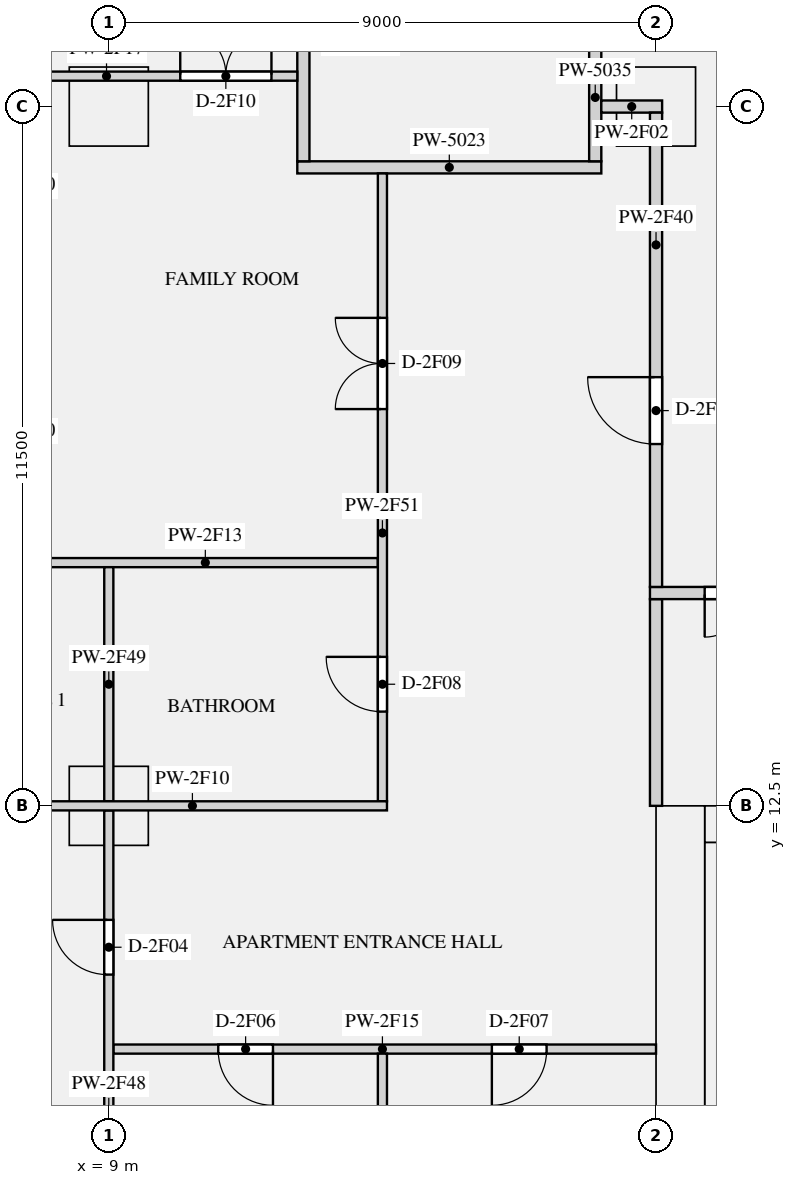
"""IFC4 building model, lengths in metres.
Left out: names, types, materials, properties, quantities, classifications, styles, units other than length and angle.
Written with IfcOpenShell. Run it as: python <this file> out.ifc"""

import sys

from ifc_helpers import new_model, si_unit, direction, frame, frame_2d, origin, origin_2d, place, context, subcontext, project, spatial, rectangle, extrude, element, fill, save


model = new_model("IFC4")
c1 = context("Model", 3, precision=1e-05, world=origin(), true_north=direction((0.0, 1.0)))
c2 = subcontext(c1, "Body", "Model", "MODEL_VIEW")
j1 = project(units=[si_unit("LENGTHUNIT", "METRE"), si_unit("PLANEANGLEUNIT", "RADIAN")], contexts=[c1])
p1 = place(None, origin())
s1 = spatial("IfcSite", under=j1, at=p1, CompositionType="ELEMENT")
p2 = place(p1, origin())
s2 = spatial("IfcBuilding", under=s1, at=p2, CompositionType="ELEMENT")
p3 = place(p2, frame((0.0, 0.0, 124.5)))
s3 = spatial("IfcBuildingStorey", under=s2, at=p3, CompositionType="ELEMENT", Elevation=124.5)
for number, where, z_axis, x_axis in (
    (1, (9.0, 24.0, 0.0), (0.0, 0.0, 1.0), (1.0, 0.0, 0.0)),
    (2, (18.0, 24.0, 0.0), (0.0, 0.0, 1.0), (1.0, 0.0, 0.0)),
    (3, (9.0, 12.5, 0.0), (0.0, 0.0, 1.0), (1.0, 0.0, 0.0)),
):
    element("IfcColumn", number, at=place(p3, frame(where, z_axis=z_axis, x_axis=x_axis)), inside=s3, PredefinedType="COLUMN", context=c2, shape_type="SweptSolid", body=[
        extrude(rectangle(XDim=1.3, YDim=1.3, at=origin_2d()), origin(), (0.0, 0.0, 1.0), 3.15),
    ])
p4 = place(p3, frame((18.4, 0.0, 0.0), z_axis=(0.0, 0.0, 1.0), x_axis=(0.0, 1.0, 0.0)))
e4 = element("IfcWall", 4, at=p4, inside=s3, PredefinedType="SHEAR", context=c2, shape_type="SweptSolid", body=[
    extrude(rectangle(XDim=12.5, YDim=0.8, at=frame_2d((6.25, 0.0))), origin(), (0.0, 0.0, 1.0), 3.15),
])
p5 = place(p3, frame((18.8, 12.2, 0.0), z_axis=(0.0, 0.0, 1.0), x_axis=(1.0, 0.0, 0.0)))
e5 = element("IfcWall", 5, at=p5, inside=s3, PredefinedType="SHEAR", context=c2, shape_type="SweptSolid", body=[
    extrude(rectangle(XDim=34.4, YDim=0.6, at=frame_2d((17.2, 0.0))), origin(), (0.0, 0.0, 1.0), 3.15),
])
p6 = place(p5, frame((24.375, 0.0, 0.0)))
e6 = element("IfcOpeningElement", 6, at=p6, cuts=e5, PredefinedType="OPENING", context=c2, shape_type="SweptSolid", body=[
    extrude(rectangle(XDim=1.1, YDim=2.1, at=frame_2d((0.55, 1.05))), frame((0.0, 0.31, 0.0), z_axis=(0.0, -1.0, 0.0), x_axis=(1.0, 0.0, 0.0)), (0.0, 0.0, 1.0), 0.62),
])
p7 = place(p5, frame((26.625, 0.0, 0.0)))
e7 = element("IfcOpeningElement", 7, at=p7, cuts=e5, PredefinedType="OPENING", context=c2, shape_type="SweptSolid", body=[
    extrude(rectangle(XDim=1.1, YDim=2.1, at=frame_2d((0.55, 1.05))), frame((0.0, 0.31, 0.0), z_axis=(0.0, -1.0, 0.0), x_axis=(1.0, 0.0, 0.0)), (0.0, 0.0, 1.0), 0.62),
])
p8 = place(p5, frame((28.875, 0.0, 0.0)))
e8 = element("IfcOpeningElement", 8, at=p8, cuts=e5, PredefinedType="OPENING", context=c2, shape_type="SweptSolid", body=[
    extrude(rectangle(XDim=1.1, YDim=2.1, at=frame_2d((0.55, 1.05))), frame((0.0, 0.31, 0.0), z_axis=(0.0, -1.0, 0.0), x_axis=(1.0, 0.0, 0.0)), (0.0, 0.0, 1.0), 0.62),
])
p9 = place(p5, frame((4.75, 0.0, 0.0)))
e9 = element("IfcOpeningElement", 9, at=p9, cuts=e5, PredefinedType="OPENING", context=c2, shape_type="SweptSolid", body=[
    extrude(rectangle(XDim=0.9, YDim=2.1, at=frame_2d((0.45, 1.05))), frame((0.0, 0.31, 0.0), z_axis=(0.0, -1.0, 0.0), x_axis=(1.0, 0.0, 0.0)), (0.0, 0.0, 1.0), 0.62),
])
p10 = place(p5, frame((11.75, 0.0, 0.0)))
e10 = element("IfcOpeningElement", 10, at=p10, cuts=e5, PredefinedType="OPENING", context=c2, shape_type="SweptSolid", body=[
    extrude(rectangle(XDim=0.9, YDim=2.1, at=frame_2d((0.45, 1.05))), frame((0.0, 0.31, 0.0), z_axis=(0.0, -1.0, 0.0), x_axis=(1.0, 0.0, 0.0)), (0.0, 0.0, 1.0), 0.62),
])
p11 = place(p5, frame((18.25, 0.0, 0.0)))
e11 = element("IfcOpeningElement", 11, at=p11, cuts=e5, PredefinedType="OPENING", context=c2, shape_type="SweptSolid", body=[
    extrude(rectangle(XDim=0.9, YDim=2.1, at=frame_2d((0.45, 1.05))), frame((0.0, 0.31, 0.0), z_axis=(0.0, -1.0, 0.0), x_axis=(1.0, 0.0, 0.0)), (0.0, 0.0, 1.0), 0.62),
])
p12 = place(p5, frame((1.35, 0.0, 0.0)))
e12 = element("IfcOpeningElement", 12, at=p12, cuts=e5, PredefinedType="OPENING", context=c2, shape_type="SweptSolid", body=[
    extrude(rectangle(XDim=1.2, YDim=2.1, at=frame_2d((0.6, 1.05))), frame((0.0, 0.31, 0.0), z_axis=(0.0, -1.0, 0.0), x_axis=(1.0, 0.0, 0.0)), (0.0, 0.0, 1.0), 0.62),
])
p13 = place(p5, frame((31.85, 0.0, 0.0)))
e13 = element("IfcOpeningElement", 13, at=p13, cuts=e5, PredefinedType="OPENING", context=c2, shape_type="SweptSolid", body=[
    extrude(rectangle(XDim=1.2, YDim=2.1, at=frame_2d((0.6, 1.05))), frame((0.0, 0.31, 0.0), z_axis=(0.0, -1.0, 0.0), x_axis=(1.0, 0.0, 0.0)), (0.0, 0.0, 1.0), 0.62),
])
p14 = place(p3, frame((18.9, 1.0, 0.0), z_axis=(0.0, 0.0, 1.0), x_axis=(0.0, 1.0, 0.0)))
e14 = element("IfcWall", 14, at=p14, inside=s3, PredefinedType="SHEAR", context=c2, shape_type="SweptSolid", body=[
    extrude(rectangle(XDim=10.9, YDim=0.2, at=frame_2d((5.45, 0.0))), origin(), (0.0, 0.0, 1.0), 3.15),
])
p15 = place(p3, frame((12.1, 23.0, 0.0), z_axis=(0.0, 0.0, 1.0), x_axis=(1.0, 0.0, 0.0)))
e15 = element("IfcWall", 15, at=p15, inside=s3, PredefinedType="PARTITIONING", context=c2, shape_type="SweptSolid", body=[
    extrude(rectangle(XDim=5.0, YDim=0.2, at=frame_2d((2.5, 0.0))), origin(), (0.0, 0.0, 1.0), 2.83),
])
p16 = place(p3, frame((18.0, 12.5, 0.0), z_axis=(0.0, 0.0, 1.0), x_axis=(0.0, 1.0, 0.0)))
e16 = element("IfcWall", 16, at=p16, inside=s3, PredefinedType="PARTITIONING", context=c2, shape_type="SweptSolid", body=[
    extrude(rectangle(XDim=3.4, YDim=0.2, at=frame_2d((1.7, 0.0))), origin(), (0.0, 0.0, 1.0), 2.83),
])
p17 = place(p3, frame((12.2, 23.1, 0.0), z_axis=(0.0, 0.0, 1.0), x_axis=(0.0, 1.0, 0.0)))
e17 = element("IfcWall", 17, at=p17, inside=s3, PredefinedType="PARTITIONING", context=c2, shape_type="SweptSolid", body=[
    extrude(rectangle(XDim=3.9, YDim=0.2, at=frame_2d((1.95, 0.0))), origin(), (0.0, 0.0, 1.0), 2.83),
])
p18 = place(p3, frame((17.0, 23.1, 0.0), z_axis=(0.0, 0.0, 1.0), x_axis=(0.0, 1.0, 0.0)))
e18 = element("IfcWall", 18, at=p18, inside=s3, PredefinedType="PARTITIONING", context=c2, shape_type="SweptSolid", body=[
    extrude(rectangle(XDim=3.8, YDim=0.2, at=frame_2d((1.9, 0.0))), origin(), (0.0, 0.0, 1.0), 2.83),
])
p19 = place(p18, frame((2.1, 0.0, 0.0)))
e19 = element("IfcOpeningElement", 19, at=p19, cuts=e18, PredefinedType="OPENING", context=c2, shape_type="SweptSolid", body=[
    extrude(rectangle(XDim=1.2, YDim=2.1, at=frame_2d((0.6, 1.05))), frame((0.0, 0.11, 0.0), z_axis=(0.0, -1.0, 0.0), x_axis=(1.0, 0.0, 0.0)), (0.0, 0.0, 1.0), 0.22),
])
p20 = place(p3, frame((17.1, 24.0, 0.0), z_axis=(0.0, 0.0, 1.0), x_axis=(1.0, 0.0, 0.0)))
e20 = element("IfcWall", 20, at=p20, inside=s3, PredefinedType="PARTITIONING", context=c2, shape_type="SweptSolid", body=[
    extrude(rectangle(XDim=1.0, YDim=0.2, at=frame_2d((0.5, 0.0))), origin(), (0.0, 0.0, 1.0), 2.83),
])
p21 = place(p3, frame((5.25, 12.5, 0.0), z_axis=(0.0, 0.0, 1.0), x_axis=(1.0, 0.0, 0.0)))
e21 = element("IfcWall", 21, at=p21, inside=s3, PredefinedType="PARTITIONING", context=c2, shape_type="SweptSolid", body=[
    extrude(rectangle(XDim=8.325, YDim=0.15, at=frame_2d((4.163, 0.0))), origin(), (0.0, 0.0, 1.0), 2.83),
])
p22 = place(p21, frame((1.025, 0.0, 0.0)))
e22 = element("IfcOpeningElement", 22, at=p22, cuts=e21, PredefinedType="OPENING", context=c2, shape_type="SweptSolid", body=[
    extrude(rectangle(XDim=0.9, YDim=2.1, at=frame_2d((0.45, 1.05))), frame((0.0, 0.085, 0.0), z_axis=(0.0, -1.0, 0.0), x_axis=(1.0, 0.0, 0.0)), (0.0, 0.0, 1.0), 0.17),
])
p23 = place(p3, frame((7.75, 16.5, 0.0), z_axis=(0.0, 0.0, 1.0), x_axis=(1.0, 0.0, 0.0)))
e23 = element("IfcWall", 23, at=p23, inside=s3, PredefinedType="PARTITIONING", context=c2, shape_type="SweptSolid", body=[
    extrude(rectangle(XDim=5.675, YDim=0.15, at=frame_2d((2.837, 0.0))), origin(), (0.0, 0.0, 1.0), 2.83),
])
p24 = place(p3, frame((9.075, 8.5, 0.0), z_axis=(0.0, 0.0, 1.0), x_axis=(1.0, 0.0, 0.0)))
e24 = element("IfcWall", 24, at=p24, inside=s3, PredefinedType="PARTITIONING", context=c2, shape_type="SweptSolid", body=[
    extrude(rectangle(XDim=8.925, YDim=0.15, at=frame_2d((4.462, 0.0))), origin(), (0.0, 0.0, 1.0), 2.83),
])
p25 = place(p24, frame((1.725, 0.0, 0.0)))
e25 = element("IfcOpeningElement", 25, at=p25, cuts=e24, PredefinedType="OPENING", context=c2, shape_type="SweptSolid", body=[
    extrude(rectangle(XDim=0.9, YDim=2.1, at=frame_2d((0.45, 1.05))), frame((0.0, 0.085, 0.0), z_axis=(0.0, -1.0, 0.0), x_axis=(1.0, 0.0, 0.0)), (0.0, 0.0, 1.0), 0.17),
])
p26 = place(p24, frame((6.225, 0.0, 0.0)))
e26 = element("IfcOpeningElement", 26, at=p26, cuts=e24, PredefinedType="OPENING", context=c2, shape_type="SweptSolid", body=[
    extrude(rectangle(XDim=0.9, YDim=2.1, at=frame_2d((0.45, 1.05))), frame((0.0, 0.085, 0.0), z_axis=(0.0, -1.0, 0.0), x_axis=(1.0, 0.0, 0.0)), (0.0, 0.0, 1.0), 0.17),
])
p27 = place(p3, frame((7.75, 24.5, 0.0), z_axis=(0.0, 0.0, 1.0), x_axis=(1.0, 0.0, 0.0)))
e27 = element("IfcWall", 27, at=p27, inside=s3, PredefinedType="PARTITIONING", context=c2, shape_type="SweptSolid", body=[
    extrude(rectangle(XDim=4.35, YDim=0.15, at=frame_2d((2.175, 0.0))), origin(), (0.0, 0.0, 1.0), 2.83),
])
p28 = place(p27, frame((2.425, 0.0, 0.0)))
e28 = element("IfcOpeningElement", 28, at=p28, cuts=e27, PredefinedType="OPENING", context=c2, shape_type="SweptSolid", body=[
    extrude(rectangle(XDim=1.5, YDim=2.1, at=frame_2d((0.75, 1.05))), frame((0.0, 0.085, 0.0), z_axis=(0.0, -1.0, 0.0), x_axis=(1.0, 0.0, 0.0)), (0.0, 0.0, 1.0), 0.17),
])
p29 = place(p3, frame((17.9, 16.0, 0.0), z_axis=(0.0, 0.0, 1.0), x_axis=(1.0, 0.0, 0.0)))
e29 = element("IfcWall", 29, at=p29, inside=s3, PredefinedType="PARTITIONING", context=c2, shape_type="SweptSolid", body=[
    extrude(rectangle(XDim=36.2, YDim=0.2, at=frame_2d((18.1, 0.0))), origin(), (0.0, 0.0, 1.0), 2.83),
])
p30 = place(p29, frame((0.9, 0.0, 0.0)))
e30 = element("IfcOpeningElement", 30, at=p30, cuts=e29, PredefinedType="OPENING", context=c2, shape_type="SweptSolid", body=[
    extrude(rectangle(XDim=1.4, YDim=2.1, at=frame_2d((0.7, 1.05))), frame((0.0, 0.11, 0.0), z_axis=(0.0, -1.0, 0.0), x_axis=(1.0, 0.0, 0.0)), (0.0, 0.0, 1.0), 0.22),
])
p31 = place(p29, frame((33.9, 0.0, 0.0)))
e31 = element("IfcOpeningElement", 31, at=p31, cuts=e29, PredefinedType="OPENING", context=c2, shape_type="SweptSolid", body=[
    extrude(rectangle(XDim=1.4, YDim=2.1, at=frame_2d((0.7, 1.05))), frame((0.0, 0.11, 0.0), z_axis=(0.0, -1.0, 0.0), x_axis=(1.0, 0.0, 0.0)), (0.0, 0.0, 1.0), 0.22),
])
p32 = place(p3, frame((18.0, 16.1, 0.0), z_axis=(0.0, 0.0, 1.0), x_axis=(0.0, 1.0, 0.0)))
e32 = element("IfcWall", 32, at=p32, inside=s3, PredefinedType="PARTITIONING", context=c2, shape_type="SweptSolid", body=[
    extrude(rectangle(XDim=7.8, YDim=0.2, at=frame_2d((3.9, 0.0))), origin(), (0.0, 0.0, 1.0), 2.83),
])
p33 = place(p32, frame((2.35, 0.0, 0.0)))
e33 = element("IfcOpeningElement", 33, at=p33, cuts=e32, PredefinedType="OPENING", context=c2, shape_type="SweptSolid", body=[
    extrude(rectangle(XDim=1.1, YDim=2.1, at=frame_2d((0.55, 1.05))), frame((0.0, 0.11, 0.0), z_axis=(0.0, -1.0, 0.0), x_axis=(1.0, 0.0, 0.0)), (0.0, 0.0, 1.0), 0.22),
])
p34 = place(p3, frame((9.0, 5.25, 0.0), z_axis=(0.0, 0.0, 1.0), x_axis=(0.0, 1.0, 0.0)))
e34 = element("IfcWall", 34, at=p34, inside=s3, PredefinedType="PARTITIONING", context=c2, shape_type="SweptSolid", body=[
    extrude(rectangle(XDim=7.175, YDim=0.15, at=frame_2d((3.587, 0.0))), origin(), (0.0, 0.0, 1.0), 2.83),
])
p35 = place(p34, frame((4.475, 0.0, 0.0)))
e35 = element("IfcOpeningElement", 35, at=p35, cuts=e34, PredefinedType="OPENING", context=c2, shape_type="SweptSolid", body=[
    extrude(rectangle(XDim=0.9, YDim=2.1, at=frame_2d((0.45, 1.05))), frame((0.0, 0.085, 0.0), z_axis=(0.0, -1.0, 0.0), x_axis=(1.0, 0.0, 0.0)), (0.0, 0.0, 1.0), 0.17),
])
p36 = place(p3, frame((9.0, 12.575, 0.0), z_axis=(0.0, 0.0, 1.0), x_axis=(0.0, 1.0, 0.0)))
e36 = element("IfcWall", 36, at=p36, inside=s3, PredefinedType="PARTITIONING", context=c2, shape_type="SweptSolid", body=[
    extrude(rectangle(XDim=3.85, YDim=0.15, at=frame_2d((1.925, 0.0))), origin(), (0.0, 0.0, 1.0), 2.83),
])
p37 = place(p3, frame((13.5, 0.75, 0.0), z_axis=(0.0, 0.0, 1.0), x_axis=(0.0, 1.0, 0.0)))
e37 = element("IfcWall", 37, at=p37, inside=s3, PredefinedType="PARTITIONING", context=c2, shape_type="SweptSolid", body=[
    extrude(rectangle(XDim=7.675, YDim=0.15, at=frame_2d((3.837, 0.0))), origin(), (0.0, 0.0, 1.0), 2.83),
])
p38 = place(p3, frame((13.5, 12.575, 0.0), z_axis=(0.0, 0.0, 1.0), x_axis=(0.0, 1.0, 0.0)))
e38 = element("IfcWall", 38, at=p38, inside=s3, PredefinedType="PARTITIONING", context=c2, shape_type="SweptSolid", body=[
    extrude(rectangle(XDim=10.325, YDim=0.15, at=frame_2d((5.163, 0.0))), origin(), (0.0, 0.0, 1.0), 2.83),
])
p39 = place(p38, frame((1.475, 0.0, 0.0)))
e39 = element("IfcOpeningElement", 39, at=p39, cuts=e38, PredefinedType="OPENING", context=c2, shape_type="SweptSolid", body=[
    extrude(rectangle(XDim=0.9, YDim=2.1, at=frame_2d((0.45, 1.05))), frame((0.0, 0.085, 0.0), z_axis=(0.0, -1.0, 0.0), x_axis=(1.0, 0.0, 0.0)), (0.0, 0.0, 1.0), 0.17),
])
p40 = place(p38, frame((6.45, 0.0, 0.0)))
e40 = element("IfcOpeningElement", 40, at=p40, cuts=e38, PredefinedType="OPENING", context=c2, shape_type="SweptSolid", body=[
    extrude(rectangle(XDim=1.5, YDim=2.1, at=frame_2d((0.75, 1.05))), frame((0.0, 0.085, 0.0), z_axis=(0.0, -1.0, 0.0), x_axis=(1.0, 0.0, 0.0)), (0.0, 0.0, 1.0), 0.17),
])
p41 = place(p30, frame((1.4, 0.0, 0.0), z_axis=(0.0, 0.0, 1.0), x_axis=(-1.0, 0.0, 0.0)))
e41 = element("IfcDoor", 41, at=p41, inside=s3, OperationType="DOUBLE_DOOR_SINGLE_SWING", PredefinedType="DOOR", context=c2, shape_type="SweptSolid", body=[
    extrude(rectangle(XDim=1.4, YDim=2.1, at=frame_2d((0.7, 1.05))), frame((0.0, 0.025, 0.0), z_axis=(0.0, -1.0, 0.0), x_axis=(1.0, 0.0, 0.0)), (0.0, 0.0, 1.0), 0.05),
])
fill(e30, e41)
p42 = place(p33, origin())
e42 = element("IfcDoor", 42, at=p42, inside=s3, OperationType="SINGLE_SWING_RIGHT", PredefinedType="DOOR", context=c2, shape_type="SweptSolid", body=[
    extrude(rectangle(XDim=1.1, YDim=2.1, at=frame_2d((0.55, 1.05))), frame((0.0, 0.025, 0.0), z_axis=(0.0, -1.0, 0.0), x_axis=(1.0, 0.0, 0.0)), (0.0, 0.0, 1.0), 0.05),
])
fill(e33, e42)
p43 = place(p35, origin())
e43 = element("IfcDoor", 43, at=p43, inside=s3, OperationType="SINGLE_SWING_RIGHT", PredefinedType="DOOR", context=c2, shape_type="SweptSolid", body=[
    extrude(rectangle(XDim=0.9, YDim=2.1, at=frame_2d((0.45, 1.05))), frame((0.0, 0.025, 0.0), z_axis=(0.0, -1.0, 0.0), x_axis=(1.0, 0.0, 0.0)), (0.0, 0.0, 1.0), 0.05),
])
fill(e35, e43)
p44 = place(p25, frame((0.9, 0.0, 0.0), z_axis=(0.0, 0.0, 1.0), x_axis=(-1.0, 0.0, 0.0)))
e44 = element("IfcDoor", 44, at=p44, inside=s3, OperationType="SINGLE_SWING_LEFT", PredefinedType="DOOR", context=c2, shape_type="SweptSolid", body=[
    extrude(rectangle(XDim=0.9, YDim=2.1, at=frame_2d((0.45, 1.05))), frame((0.0, 0.025, 0.0), z_axis=(0.0, -1.0, 0.0), x_axis=(1.0, 0.0, 0.0)), (0.0, 0.0, 1.0), 0.05),
])
fill(e25, e44)
p45 = place(p26, frame((0.9, 0.0, 0.0), z_axis=(0.0, 0.0, 1.0), x_axis=(-1.0, 0.0, 0.0)))
e45 = element("IfcDoor", 45, at=p45, inside=s3, OperationType="SINGLE_SWING_RIGHT", PredefinedType="DOOR", context=c2, shape_type="SweptSolid", body=[
    extrude(rectangle(XDim=0.9, YDim=2.1, at=frame_2d((0.45, 1.05))), frame((0.0, 0.025, 0.0), z_axis=(0.0, -1.0, 0.0), x_axis=(1.0, 0.0, 0.0)), (0.0, 0.0, 1.0), 0.05),
])
fill(e26, e45)
p46 = place(p39, origin())
e46 = element("IfcDoor", 46, at=p46, inside=s3, OperationType="SINGLE_SWING_RIGHT", PredefinedType="DOOR", context=c2, shape_type="SweptSolid", body=[
    extrude(rectangle(XDim=0.9, YDim=2.1, at=frame_2d((0.45, 1.05))), frame((0.0, 0.025, 0.0), z_axis=(0.0, -1.0, 0.0), x_axis=(1.0, 0.0, 0.0)), (0.0, 0.0, 1.0), 0.05),
])
fill(e39, e46)
p47 = place(p40, origin())
e47 = element("IfcDoor", 47, at=p47, inside=s3, OperationType="DOUBLE_DOOR_SINGLE_SWING", PredefinedType="DOOR", context=c2, shape_type="SweptSolid", body=[
    extrude(rectangle(XDim=1.5, YDim=2.1, at=frame_2d((0.75, 1.05))), frame((0.0, 0.025, 0.0), z_axis=(0.0, -1.0, 0.0), x_axis=(1.0, 0.0, 0.0)), (0.0, 0.0, 1.0), 0.05),
])
fill(e40, e47)
p48 = place(p28, origin())
e48 = element("IfcDoor", 48, at=p48, inside=s3, OperationType="DOUBLE_DOOR_SINGLE_SWING", PredefinedType="DOOR", context=c2, shape_type="SweptSolid", body=[
    extrude(rectangle(XDim=1.5, YDim=2.1, at=frame_2d((0.75, 1.05))), frame((0.0, 0.025, 0.0), z_axis=(0.0, -1.0, 0.0), x_axis=(1.0, 0.0, 0.0)), (0.0, 0.0, 1.0), 0.05),
])
fill(e28, e48)
save(model, sys.argv[1])
